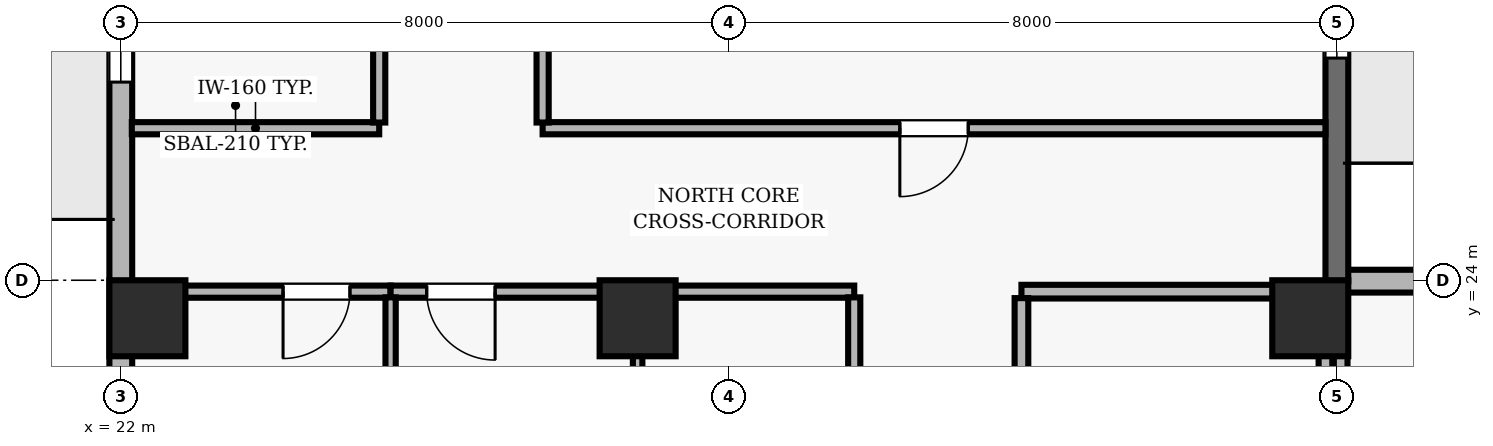
"""IFC4 building model, lengths in metres.
Left out: names, types, materials, properties, quantities, classifications, styles, units other than length and angle.
Written with IfcOpenShell. Run it as: python <this file> out.ifc"""

import sys

from ifc_helpers import new_model, si_unit, direction, frame, frame_2d, origin, origin_2d, place, context, subcontext, project, spatial, rectangle, extrude, element, fill, save


model = new_model("IFC4")
c1 = context("Model", 3, precision=1e-05, world=origin(), true_north=direction((0.0, 1.0)))
c2 = subcontext(c1, "Body", "Model", "MODEL_VIEW")
j1 = project(units=[si_unit("LENGTHUNIT", "METRE"), si_unit("PLANEANGLEUNIT", "RADIAN")], contexts=[c1])
p1 = place(None, origin())
s1 = spatial("IfcSite", under=j1, at=p1, CompositionType="ELEMENT")
p2 = place(p1, origin())
s2 = spatial("IfcBuilding", under=s1, at=p2, CompositionType="ELEMENT")
p3 = place(p2, frame((0.0, 0.0, 187.5)))
s3 = spatial("IfcBuildingStorey", under=s2, at=p3, CompositionType="ELEMENT", Elevation=187.5)
for number, where, z_axis, x_axis in (
    (1, (22.35, 23.5, 0.0), (0.0, 0.0, 1.0), (1.0, 0.0, 0.0)),
    (2, (28.8, 23.5, 0.0), (0.0, 0.0, 1.0), (1.0, 0.0, 0.0)),
    (3, (37.65, 23.5, 0.0), (0.0, 0.0, 1.0), (1.0, 0.0, 0.0)),
):
    element("IfcColumn", number, at=place(p3, frame(where, z_axis=z_axis, x_axis=x_axis)), inside=s3, PredefinedType="COLUMN", context=c2, shape_type="SweptSolid", body=[
        extrude(rectangle(XDim=1.0, YDim=1.0, at=origin_2d()), origin(), (0.0, 0.0, 1.0), 3.9),
    ])
p4 = place(p3, frame((47.35, 23.988, 0.0), z_axis=(0.0, 0.0, 1.0), x_axis=(-1.0, 0.0, 0.0)))
e4 = element("IfcWall", 4, at=p4, inside=s3, PredefinedType="SOLIDWALL", context=c2, shape_type="SweptSolid", body=[
    extrude(rectangle(XDim=9.35, YDim=0.3, at=frame_2d((4.675, 0.0))), origin(), (0.0, 0.0, 1.0), 3.69),
])
p5 = place(p4, frame((3.475, 0.0, 0.9)))
e5 = element("IfcOpeningElement", 5, at=p5, cuts=e4, PredefinedType="OPENING", context=c2, shape_type="SweptSolid", body=[
    extrude(rectangle(XDim=2.4, YDim=1.6, at=frame_2d((1.2, 0.8))), frame((0.0, 0.16, 0.0), z_axis=(0.0, -1.0, 0.0), x_axis=(1.0, 0.0, 0.0)), (0.0, 0.0, 1.0), 0.32),
])
p6 = place(p3, frame((38.0, 23.988, 0.0), z_axis=(0.0, 0.0, 1.0), x_axis=(0.0, 1.0, 0.0)))
e6 = element("IfcWall", 6, at=p6, inside=s3, PredefinedType="SOLIDWALL", context=c2, shape_type="SweptSolid", body=[
    extrude(rectangle(XDim=16.712, YDim=0.3, at=frame_2d((8.356, 0.0))), origin(), (0.0, 0.0, 1.0), 3.69),
])
p7 = place(p6, frame((8.282, 0.0, 0.0)))
e7 = element("IfcOpeningElement", 7, at=p7, cuts=e6, PredefinedType="OPENING", context=c2, shape_type="SweptSolid", body=[
    extrude(rectangle(XDim=1.0, YDim=2.2, at=frame_2d((0.5, 1.1))), frame((0.0, 0.16, 0.0), z_axis=(0.0, -1.0, 0.0), x_axis=(1.0, 0.0, 0.0)), (0.0, 0.0, 1.0), 0.32),
])
p8 = place(p6, frame((2.935, 0.0, 0.9)))
e8 = element("IfcOpeningElement", 8, at=p8, cuts=e6, PredefinedType="OPENING", context=c2, shape_type="SweptSolid", body=[
    extrude(rectangle(XDim=1.5, YDim=1.8, at=frame_2d((0.75, 0.9))), frame((0.0, 0.16, 0.0), z_axis=(0.0, -1.0, 0.0), x_axis=(1.0, 0.0, 0.0)), (0.0, 0.0, 1.0), 0.32),
])
p9 = place(p6, frame((12.727, 0.0, 0.9)))
e9 = element("IfcOpeningElement", 9, at=p9, cuts=e6, PredefinedType="OPENING", context=c2, shape_type="SweptSolid", body=[
    extrude(rectangle(XDim=1.5, YDim=1.8, at=frame_2d((0.75, 0.9))), frame((0.0, 0.16, 0.0), z_axis=(0.0, -1.0, 0.0), x_axis=(1.0, 0.0, 0.0)), (0.0, 0.0, 1.0), 0.32),
])
p10 = place(p3, frame((22.0, 40.7, 0.0), z_axis=(0.0, 0.0, 1.0), x_axis=(0.0, -1.0, 0.0)))
e10 = element("IfcWall", 10, at=p10, inside=s3, PredefinedType="SOLIDWALL", context=c2, shape_type="SweptSolid", body=[
    extrude(rectangle(XDim=38.2, YDim=0.3, at=frame_2d((19.1, 0.0))), origin(), (0.0, 0.0, 1.0), 3.69),
])
p11 = place(p10, frame((7.8, 0.0, 0.0)))
e11 = element("IfcOpeningElement", 11, at=p11, cuts=e10, PredefinedType="OPENING", context=c2, shape_type="SweptSolid", body=[
    extrude(rectangle(XDim=1.0, YDim=2.2, at=frame_2d((0.5, 1.1))), frame((0.0, 0.16, 0.0), z_axis=(0.0, -1.0, 0.0), x_axis=(1.0, 0.0, 0.0)), (0.0, 0.0, 1.0), 0.32),
])
p12 = place(p10, frame((12.293, 0.0, 0.9)))
e12 = element("IfcOpeningElement", 12, at=p12, cuts=e10, PredefinedType="OPENING", context=c2, shape_type="SweptSolid", body=[
    extrude(rectangle(XDim=1.8, YDim=2.2, at=frame_2d((0.9, 1.1))), frame((0.0, 0.16, 0.0), z_axis=(0.0, -1.0, 0.0), x_axis=(1.0, 0.0, 0.0)), (0.0, 0.0, 1.0), 0.32),
])
p13 = place(p10, frame((18.2, 0.0, 0.9)))
e13 = element("IfcOpeningElement", 13, at=p13, cuts=e10, PredefinedType="OPENING", context=c2, shape_type="SweptSolid", body=[
    extrude(rectangle(XDim=1.8, YDim=2.2, at=frame_2d((0.9, 1.1))), frame((0.0, 0.16, 0.0), z_axis=(0.0, -1.0, 0.0), x_axis=(1.0, 0.0, 0.0)), (0.0, 0.0, 1.0), 0.32),
])
p14 = place(p10, frame((23.207, 0.0, 0.9)))
e14 = element("IfcOpeningElement", 14, at=p14, cuts=e10, PredefinedType="OPENING", context=c2, shape_type="SweptSolid", body=[
    extrude(rectangle(XDim=1.8, YDim=2.2, at=frame_2d((0.9, 1.1))), frame((0.0, 0.16, 0.0), z_axis=(0.0, -1.0, 0.0), x_axis=(1.0, 0.0, 0.0)), (0.0, 0.0, 1.0), 0.32),
])
p15 = place(p10, frame((29.114, 0.0, 0.9)))
e15 = element("IfcOpeningElement", 15, at=p15, cuts=e10, PredefinedType="OPENING", context=c2, shape_type="SweptSolid", body=[
    extrude(rectangle(XDim=1.8, YDim=2.2, at=frame_2d((0.9, 1.1))), frame((0.0, 0.16, 0.0), z_axis=(0.0, -1.0, 0.0), x_axis=(1.0, 0.0, 0.0)), (0.0, 0.0, 1.0), 0.32),
])
p16 = place(p3, frame((25.4, 26.0, 0.0), z_axis=(0.0, 0.0, 1.0), x_axis=(-1.0, 0.0, 0.0)))
e16 = element("IfcWall", 16, at=p16, inside=s3, PredefinedType="PARTITIONING", context=c2, shape_type="SweptSolid", body=[
    extrude(rectangle(XDim=3.255, YDim=0.16, at=frame_2d((1.627, 0.0))), origin(), (0.0, 0.0, 1.0), 3.69),
])
p17 = place(p3, frame((25.55, 23.85, 0.0), z_axis=(0.0, 0.0, 1.0), x_axis=(-1.0, 0.0, 0.0)))
e17 = element("IfcWall", 17, at=p17, inside=s3, PredefinedType="PARTITIONING", context=c2, shape_type="SweptSolid", body=[
    extrude(rectangle(XDim=3.35, YDim=0.16, at=frame_2d((1.675, 0.0))), origin(), (0.0, 0.0, 1.0), 3.146),
])
p18 = place(p17, frame((0.535, 0.0, 0.0)))
e18 = element("IfcOpeningElement", 18, at=p18, cuts=e17, PredefinedType="OPENING", context=c2, shape_type="SweptSolid", body=[
    extrude(rectangle(XDim=0.88, YDim=2.1, at=frame_2d((0.44, 1.05))), frame((0.0, 0.09, 0.0), z_axis=(0.0, -1.0, 0.0), x_axis=(1.0, 0.0, 0.0)), (0.0, 0.0, 1.0), 0.18),
])
p19 = place(p3, frame((28.8, 23.85, 0.0), z_axis=(0.0, 0.0, 1.0), x_axis=(-1.0, 0.0, 0.0)))
e19 = element("IfcWall", 19, at=p19, inside=s3, PredefinedType="PARTITIONING", context=c2, shape_type="SweptSolid", body=[
    extrude(rectangle(XDim=3.25, YDim=0.16, at=frame_2d((1.625, 0.0))), origin(), (0.0, 0.0, 1.0), 3.146),
])
p20 = place(p19, frame((1.875, 0.0, 0.0)))
e20 = element("IfcOpeningElement", 20, at=p20, cuts=e19, PredefinedType="OPENING", context=c2, shape_type="SweptSolid", body=[
    extrude(rectangle(XDim=0.9, YDim=2.1, at=frame_2d((0.45, 1.05))), frame((0.0, 0.09, 0.0), z_axis=(0.0, -1.0, 0.0), x_axis=(1.0, 0.0, 0.0)), (0.0, 0.0, 1.0), 0.18),
])
p21 = place(p3, frame((31.65, 23.85, 0.0), z_axis=(0.0, 0.0, 1.0), x_axis=(-1.0, 0.0, 0.0)))
e21 = element("IfcWall", 21, at=p21, inside=s3, PredefinedType="PARTITIONING", context=c2, shape_type="SweptSolid", body=[
    extrude(rectangle(XDim=2.85, YDim=0.16, at=frame_2d((1.425, 0.0))), origin(), (0.0, 0.0, 1.0), 3.146),
])
p22 = place(p3, frame((37.85, 23.85, 0.0), z_axis=(0.0, 0.0, 1.0), x_axis=(-1.0, 0.0, 0.0)))
e22 = element("IfcWall", 22, at=p22, inside=s3, PredefinedType="PARTITIONING", context=c2, shape_type="SweptSolid", body=[
    extrude(rectangle(XDim=4.0, YDim=0.18, at=frame_2d((2.0, 0.0))), origin(), (0.0, 0.0, 1.0), 3.146),
])
p23 = place(p3, frame((37.85, 26.0, 0.0), z_axis=(0.0, 0.0, 1.0), x_axis=(-1.0, 0.0, 0.0)))
e23 = element("IfcWall", 23, at=p23, inside=s3, PredefinedType="PARTITIONING", context=c2, shape_type="SweptSolid", body=[
    extrude(rectangle(XDim=10.3, YDim=0.16, at=frame_2d((5.15, 0.0))), origin(), (0.0, 0.0, 1.0), 3.69),
])
p24 = place(p23, frame((4.7, 0.0, 0.0)))
e24 = element("IfcOpeningElement", 24, at=p24, cuts=e23, PredefinedType="OPENING", context=c2, shape_type="SweptSolid", body=[
    extrude(rectangle(XDim=0.9, YDim=2.1, at=frame_2d((0.45, 1.05))), frame((0.0, 0.09, 0.0), z_axis=(0.0, -1.0, 0.0), x_axis=(1.0, 0.0, 0.0)), (0.0, 0.0, 1.0), 0.18),
])
p25 = place(p3, frame((25.4, 29.942, 0.0), z_axis=(0.0, 0.0, 1.0), x_axis=(0.0, -1.0, 0.0)))
e25 = element("IfcWall", 25, at=p25, inside=s3, PredefinedType="PARTITIONING", context=c2, shape_type="SweptSolid", body=[
    extrude(rectangle(XDim=3.867, YDim=0.16, at=frame_2d((1.934, 0.0))), origin(), (0.0, 0.0, 1.0), 3.69),
])
p26 = place(p25, frame((1.484, 0.0, 0.0)))
e26 = element("IfcOpeningElement", 26, at=p26, cuts=e25, PredefinedType="OPENING", context=c2, shape_type="SweptSolid", body=[
    extrude(rectangle(XDim=0.9, YDim=2.1, at=frame_2d((0.45, 1.05))), frame((0.0, 0.09, 0.0), z_axis=(0.0, -1.0, 0.0), x_axis=(1.0, 0.0, 0.0)), (0.0, 0.0, 1.0), 0.18),
])
p27 = place(p3, frame((25.55, 19.16, 0.0), z_axis=(0.0, 0.0, 1.0), x_axis=(0.0, 1.0, 0.0)))
e27 = element("IfcWall", 27, at=p27, inside=s3, PredefinedType="PARTITIONING", context=c2, shape_type="SweptSolid", body=[
    extrude(rectangle(XDim=4.615, YDim=0.135, at=frame_2d((2.308, 0.0))), origin(), (0.0, 0.0, 1.0), 3.69),
])
p28 = place(p3, frame((27.55, 26.075, 0.0), z_axis=(0.0, 0.0, 1.0), x_axis=(0.0, 1.0, 0.0)))
e28 = element("IfcWall", 28, at=p28, inside=s3, PredefinedType="PARTITIONING", context=c2, shape_type="SweptSolid", body=[
    extrude(rectangle(XDim=3.867, YDim=0.16, at=frame_2d((1.934, 0.0))), origin(), (0.0, 0.0, 1.0), 3.69),
])
p29 = place(p3, frame((28.8, 23.775, 0.0), z_axis=(0.0, 0.0, 1.0), x_axis=(0.0, -1.0, 0.0)))
e29 = element("IfcWall", 29, at=p29, inside=s3, PredefinedType="PARTITIONING", context=c2, shape_type="SweptSolid", body=[
    extrude(rectangle(XDim=4.615, YDim=0.125, at=frame_2d((2.308, 0.0))), origin(), (0.0, 0.0, 1.0), 3.69),
])
p30 = place(p3, frame((31.65, 19.01, 0.0), z_axis=(0.0, 0.0, 1.0), x_axis=(0.0, 1.0, 0.0)))
e30 = element("IfcWall", 30, at=p30, inside=s3, PredefinedType="PARTITIONING", context=c2, shape_type="SweptSolid", body=[
    extrude(rectangle(XDim=4.765, YDim=0.16, at=frame_2d((2.382, 0.0))), origin(), (0.0, 0.0, 1.0), 3.69),
])
p31 = place(p30, frame((1.932, 0.0, 0.0)))
e31 = element("IfcOpeningElement", 31, at=p31, cuts=e30, PredefinedType="OPENING", context=c2, shape_type="SweptSolid", body=[
    extrude(rectangle(XDim=0.9, YDim=2.1, at=frame_2d((0.45, 1.05))), frame((0.0, 0.09, 0.0), z_axis=(0.0, -1.0, 0.0), x_axis=(1.0, 0.0, 0.0)), (0.0, 0.0, 1.0), 0.18),
])
p32 = place(p3, frame((33.85, 17.735, 0.0), z_axis=(0.0, 0.0, 1.0), x_axis=(0.0, 1.0, 0.0)))
e32 = element("IfcWall", 32, at=p32, inside=s3, PredefinedType="PARTITIONING", context=c2, shape_type="SweptSolid", body=[
    extrude(rectangle(XDim=6.03, YDim=0.18, at=frame_2d((3.015, 0.0))), origin(), (0.0, 0.0, 1.0), 3.69),
])
p33 = place(p32, frame((2.54, 0.0, 0.0)))
e33 = element("IfcOpeningElement", 33, at=p33, cuts=e32, PredefinedType="OPENING", context=c2, shape_type="SweptSolid", body=[
    extrude(rectangle(XDim=0.95, YDim=2.1, at=frame_2d((0.475, 1.05))), frame((0.0, 0.1, 0.0), z_axis=(0.0, -1.0, 0.0), x_axis=(1.0, 0.0, 0.0)), (0.0, 0.0, 1.0), 0.2),
])
p34 = place(p3, frame((37.85, 17.65, 0.0), z_axis=(0.0, 0.0, 1.0), x_axis=(0.0, 1.0, 0.0)))
e34 = element("IfcWall", 34, at=p34, inside=s3, PredefinedType="PARTITIONING", context=c2, shape_type="SweptSolid", body=[
    extrude(rectangle(XDim=6.115, YDim=0.18, at=frame_2d((3.058, 0.0))), origin(), (0.0, 0.0, 1.0), 3.146),
])
p35 = place(p3, frame((38.05, 23.843, 0.0), z_axis=(0.0, 0.0, 1.0), x_axis=(0.0, -1.0, 0.0)))
e35 = element("IfcWall", 35, at=p35, inside=s3, PredefinedType="PARTITIONING", context=c2, shape_type="SweptSolid", body=[
    extrude(rectangle(XDim=7.768, YDim=0.18, at=frame_2d((3.884, 0.0))), origin(), (0.0, 0.0, 1.0), 3.146),
])
p36 = place(p8, origin())
e36 = element("IfcWindow", 36, at=p36, inside=s3, PartitioningType="SINGLE_PANEL", PredefinedType="WINDOW", context=c2, shape_type="SweptSolid", body=[
    extrude(rectangle(XDim=1.5, YDim=1.8, at=frame_2d((0.75, 0.9))), frame((0.0, 0.03, 0.0), z_axis=(0.0, -1.0, 0.0), x_axis=(1.0, 0.0, 0.0)), (0.0, 0.0, 1.0), 0.06),
])
fill(e8, e36)
p37 = place(p12, origin())
e37 = element("IfcWindow", 37, at=p37, inside=s3, PartitioningType="SINGLE_PANEL", PredefinedType="WINDOW", context=c2, shape_type="SweptSolid", body=[
    extrude(rectangle(XDim=1.8, YDim=2.2, at=frame_2d((0.9, 1.1))), frame((0.0, 0.03, 0.0), z_axis=(0.0, -1.0, 0.0), x_axis=(1.0, 0.0, 0.0)), (0.0, 0.0, 1.0), 0.06),
])
fill(e12, e37)
p38 = place(p18, origin())
e38 = element("IfcDoor", 38, at=p38, inside=s3, OperationType="SINGLE_SWING_RIGHT", PredefinedType="DOOR", context=c2, shape_type="SweptSolid", body=[
    extrude(rectangle(XDim=0.88, YDim=2.1, at=frame_2d((0.44, 1.05))), frame((0.0, 0.025, 0.0), z_axis=(0.0, -1.0, 0.0), x_axis=(1.0, 0.0, 0.0)), (0.0, 0.0, 1.0), 0.05),
])
fill(e18, e38)
p39 = place(p20, origin())
e39 = element("IfcDoor", 39, at=p39, inside=s3, OperationType="SINGLE_SWING_LEFT", PredefinedType="DOOR", context=c2, shape_type="SweptSolid", body=[
    extrude(rectangle(XDim=0.9, YDim=2.1, at=frame_2d((0.45, 1.05))), frame((0.0, 0.025, 0.0), z_axis=(0.0, -1.0, 0.0), x_axis=(1.0, 0.0, 0.0)), (0.0, 0.0, 1.0), 0.05),
])
fill(e20, e39)
p40 = place(p24, origin())
e40 = element("IfcDoor", 40, at=p40, inside=s3, OperationType="SINGLE_SWING_RIGHT", PredefinedType="DOOR", context=c2, shape_type="SweptSolid", body=[
    extrude(rectangle(XDim=0.9, YDim=2.1, at=frame_2d((0.45, 1.05))), frame((0.0, 0.025, 0.0), z_axis=(0.0, -1.0, 0.0), x_axis=(1.0, 0.0, 0.0)), (0.0, 0.0, 1.0), 0.05),
])
fill(e24, e40)
save(model, sys.argv[1])
